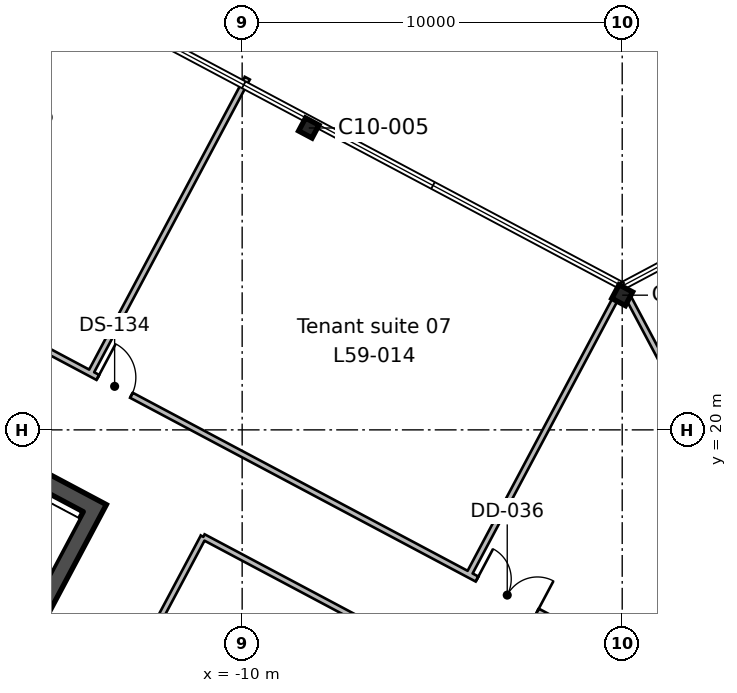
"""IFC4 building model, lengths in metres.
Left out: names, types, materials, properties, quantities, classifications, styles, units other than length and angle.
Written with IfcOpenShell. Run it as: python <this file> out.ifc"""

import sys

from ifc_helpers import new_model, si_unit, direction, frame, frame_2d, origin, origin_2d, place, context, subcontext, project, spatial, rectangle, i_section, extrude, element, fill, save


model = new_model("IFC4")
c1 = context("Model", 3, precision=1e-05, world=origin(), true_north=direction((0.0, 1.0)))
c2 = subcontext(c1, "Body", "Model", "MODEL_VIEW")
j1 = project(units=[si_unit("LENGTHUNIT", "METRE"), si_unit("PLANEANGLEUNIT", "RADIAN")], contexts=[c1])
p1 = place(None, origin())
s1 = spatial("IfcSite", under=j1, at=p1, CompositionType="ELEMENT")
p2 = place(p1, origin())
s2 = spatial("IfcBuilding", under=s1, at=p2, CompositionType="ELEMENT")
p3 = place(p2, frame((0.0, 0.0, 265.8)))
s3 = spatial("IfcBuildingStorey", under=s2, at=p3, CompositionType="ELEMENT", Elevation=265.8)
p4 = place(p3, frame((0.0, 23.544, 0.0), z_axis=(0.0, 0.0, 1.0), x_axis=(-0.882947592859, 0.469471562786, 0.0)))
e1 = element("IfcColumn", 1, at=p4, inside=s3, PredefinedType="COLUMN", context=c2, shape_type="SweptSolid", body=[
    extrude(i_section(OverallWidth=0.404, OverallDepth=0.406, WebThickness=0.027, FlangeThickness=0.044, FilletRadius=0.015, at=origin_2d()), origin(), (0.0, 0.0, 1.0), 3.9),
])
p5 = place(p3, frame((-8.247, 27.943, 0.0), z_axis=(0.0, 0.0, 1.0), x_axis=(-0.882947592859, 0.469471562786, 0.0)))
e2 = element("IfcColumn", 2, at=p5, inside=s3, PredefinedType="COLUMN", context=c2, shape_type="SweptSolid", body=[
    extrude(i_section(OverallWidth=0.399, OverallDepth=0.386, WebThickness=0.021, FlangeThickness=0.033, FilletRadius=0.015, at=origin_2d()), origin(), (0.0, 0.0, 1.0), 3.9),
])
p6 = place(p3, frame((-13.771, 18.138, 0.0), z_axis=(0.0, 0.0, 1.0), x_axis=(-0.469467968382, -0.882949504028, 0.0)))
e3 = element("IfcWall", 3, at=p6, inside=s3, PredefinedType="SHEAR", context=c2, shape_type="SweptSolid", body=[
    extrude(rectangle(XDim=19.1, YDim=0.45, at=frame_2d((9.55, 0.0))), origin(), (0.0, 0.0, 1.0), 3.9),
])
p7 = place(p6, frame((6.55, 0.0, 0.0)))
e4 = element("IfcOpeningElement", 4, at=p7, cuts=e3, PredefinedType="OPENING", context=c2, shape_type="SweptSolid", body=[
    extrude(rectangle(XDim=2.4, YDim=2.4, at=frame_2d((1.2, 1.2))), frame((0.0, 0.235, 0.0), z_axis=(0.0, -1.0, 0.0), x_axis=(1.0, 0.0, 0.0)), (0.0, 0.0, 1.0), 0.47),
])
p8 = place(p3, frame((-14.076, 18.045, 0.0), z_axis=(0.0, 0.0, 1.0), x_axis=(-0.882947755831, 0.46947125628, 0.0)))
e5 = element("IfcWall", 5, at=p8, inside=s3, PredefinedType="SHEAR", context=c2, shape_type="SweptSolid", body=[
    extrude(rectangle(XDim=20.2, YDim=0.45, at=frame_2d((10.1, 0.0))), origin(), (0.0, 0.0, 1.0), 3.9),
])
p9 = place(p3, frame((-48.541, 39.854, 0.0), z_axis=(0.0, 0.0, 1.0), x_axis=(0.882945008423, -0.469476423372, 0.0)))
e6 = element("IfcWall", 6, at=p9, inside=s3, PredefinedType="PARTITIONING", context=c2, shape_type="SweptSolid", body=[
    extrude(rectangle(XDim=54.976, YDim=0.15, at=frame_2d((27.488, 0.0))), origin(), (0.0, 0.0, 1.0), 3.54),
])
p10 = place(p9, frame((50.65, 0.0, 0.0)))
e7 = element("IfcOpeningElement", 7, at=p10, cuts=e6, PredefinedType="OPENING", context=c2, shape_type="SweptSolid", body=[
    extrude(rectangle(XDim=1.8, YDim=2.1, at=frame_2d((0.9, 1.05))), frame((0.0, 0.085, 0.0), z_axis=(0.0, -1.0, 0.0), x_axis=(1.0, 0.0, 0.0)), (0.0, 0.0, 1.0), 0.17),
])
p11 = place(p9, frame((39.35, 0.0, 0.0)))
e8 = element("IfcOpeningElement", 8, at=p11, cuts=e6, PredefinedType="OPENING", context=c2, shape_type="SweptSolid", body=[
    extrude(rectangle(XDim=1.0, YDim=2.1, at=frame_2d((0.5, 1.05))), frame((0.0, 0.085, 0.0), z_axis=(0.0, -1.0, 0.0), x_axis=(1.0, 0.0, 0.0)), (0.0, 0.0, 1.0), 0.17),
])
p12 = place(p9, frame((26.95, 0.0, 0.0)))
e9 = element("IfcOpeningElement", 9, at=p12, cuts=e6, PredefinedType="OPENING", context=c2, shape_type="SweptSolid", body=[
    extrude(rectangle(XDim=1.0, YDim=2.1, at=frame_2d((0.5, 1.05))), frame((0.0, 0.085, 0.0), z_axis=(0.0, -1.0, 0.0), x_axis=(1.0, 0.0, 0.0)), (0.0, 0.0, 1.0), 0.17),
])
p13 = place(p9, frame((21.049, 0.0, 0.0)))
e10 = element("IfcOpeningElement", 10, at=p13, cuts=e6, PredefinedType="OPENING", context=c2, shape_type="SweptSolid", body=[
    extrude(rectangle(XDim=1.0, YDim=2.1, at=frame_2d((0.5, 1.05))), frame((0.0, 0.085, 0.0), z_axis=(0.0, -1.0, 0.0), x_axis=(1.0, 0.0, 0.0)), (0.0, 0.0, 1.0), 0.17),
])
p14 = place(p9, frame((15.35, 0.0, 0.0)))
e11 = element("IfcOpeningElement", 11, at=p14, cuts=e6, PredefinedType="OPENING", context=c2, shape_type="SweptSolid", body=[
    extrude(rectangle(XDim=1.0, YDim=2.1, at=frame_2d((0.5, 1.05))), frame((0.0, 0.085, 0.0), z_axis=(0.0, -1.0, 0.0), x_axis=(1.0, 0.0, 0.0)), (0.0, 0.0, 1.0), 0.17),
])
p15 = place(p3, frame((0.0, 14.044, 0.0), z_axis=(0.0, 0.0, 1.0), x_axis=(0.882952097871, 0.469463089992, 0.0)))
e12 = element("IfcWall", 12, at=p15, inside=s3, PredefinedType="PARTITIONING", context=c2, shape_type="SweptSolid", body=[
    extrude(rectangle(XDim=33.607, YDim=0.15, at=frame_2d((16.803, 0.0))), origin(), (0.0, 0.0, 1.0), 3.54),
])
p16 = place(p3, frame((-9.864, 29.255, 0.0), z_axis=(0.0, 0.0, 1.0), x_axis=(-0.469457446168, -0.882955098653, 0.0)))
e13 = element("IfcWall", 13, at=p16, inside=s3, PredefinedType="PARTITIONING", context=c2, shape_type="SweptSolid", body=[
    extrude(rectangle(XDim=8.8, YDim=0.15, at=frame_2d((4.4, 0.0))), origin(), (0.0, 0.0, 1.0), 3.54),
])
p17 = place(p3, frame((-0.195, 23.418, 0.0), z_axis=(0.0, 0.0, 1.0), x_axis=(-0.469409645302, -0.882980512184, 0.0)))
e14 = element("IfcWall", 14, at=p17, inside=s3, PredefinedType="PARTITIONING", context=c2, shape_type="SweptSolid", body=[
    extrude(rectangle(XDim=8.185, YDim=0.15, at=frame_2d((4.092, 0.0))), origin(), (0.0, 0.0, 1.0), 3.54),
])
p18 = place(p3, frame((0.179, 23.45, 0.0), z_axis=(0.0, 0.0, 1.0), x_axis=(0.469359563697, -0.88300713472, 0.0)))
e15 = element("IfcWall", 15, at=p18, inside=s3, PredefinedType="PARTITIONING", context=c2, shape_type="SweptSolid", body=[
    extrude(rectangle(XDim=2.621, YDim=0.15, at=frame_2d((1.31, 0.0))), origin(), (0.0, 0.0, 1.0), 3.54),
])
p19 = place(p3, frame((-20.411, -0.473, 0.0), z_axis=(0.0, 0.0, 1.0), x_axis=(0.469451816494, 0.882958091865, 0.0)))
e16 = element("IfcWall", 16, at=p19, inside=s3, PredefinedType="PARTITIONING", context=c2, shape_type="SweptSolid", body=[
    extrude(rectangle(XDim=20.0, YDim=0.15, at=frame_2d((10.0, 0.0))), origin(), (0.0, 0.0, 1.0), 3.54),
])
p20 = place(p19, frame((9.45, 0.0, 0.0)))
e17 = element("IfcOpeningElement", 17, at=p20, cuts=e16, PredefinedType="OPENING", context=c2, shape_type="SweptSolid", body=[
    extrude(rectangle(XDim=1.0, YDim=2.1, at=frame_2d((0.5, 1.05))), frame((0.0, 0.085, 0.0), z_axis=(0.0, -1.0, 0.0), x_axis=(1.0, 0.0, 0.0)), (0.0, 0.0, 1.0), 0.17),
])
p21 = place(p3, frame((-11.022, 17.186, 0.0), z_axis=(0.0, 0.0, 1.0), x_axis=(0.882943783905, -0.469478726316, 0.0)))
e18 = element("IfcWall", 18, at=p21, inside=s3, PredefinedType="PARTITIONING", context=c2, shape_type="SweptSolid", body=[
    extrude(rectangle(XDim=6.786, YDim=0.15, at=frame_2d((3.393, 0.0))), origin(), (0.0, 0.0, 1.0), 3.54),
])
p22 = place(p10, origin())
e19 = element("IfcDoor", 19, at=p22, inside=s3, OperationType="DOUBLE_DOOR_SINGLE_SWING", PredefinedType="DOOR", context=c2, shape_type="SweptSolid", body=[
    extrude(rectangle(XDim=1.8, YDim=2.1, at=frame_2d((0.9, 1.05))), frame((0.0, 0.025, 0.0), z_axis=(0.0, -1.0, 0.0), x_axis=(1.0, 0.0, 0.0)), (0.0, 0.0, 1.0), 0.05),
])
fill(e7, e19)
p23 = place(p11, origin())
e20 = element("IfcDoor", 20, at=p23, inside=s3, OperationType="SINGLE_SWING_LEFT", PredefinedType="DOOR", context=c2, shape_type="SweptSolid", body=[
    extrude(rectangle(XDim=1.0, YDim=2.1, at=frame_2d((0.5, 1.05))), frame((0.0, 0.025, 0.0), z_axis=(0.0, -1.0, 0.0), x_axis=(1.0, 0.0, 0.0)), (0.0, 0.0, 1.0), 0.05),
])
fill(e8, e20)
save(model, sys.argv[1])
